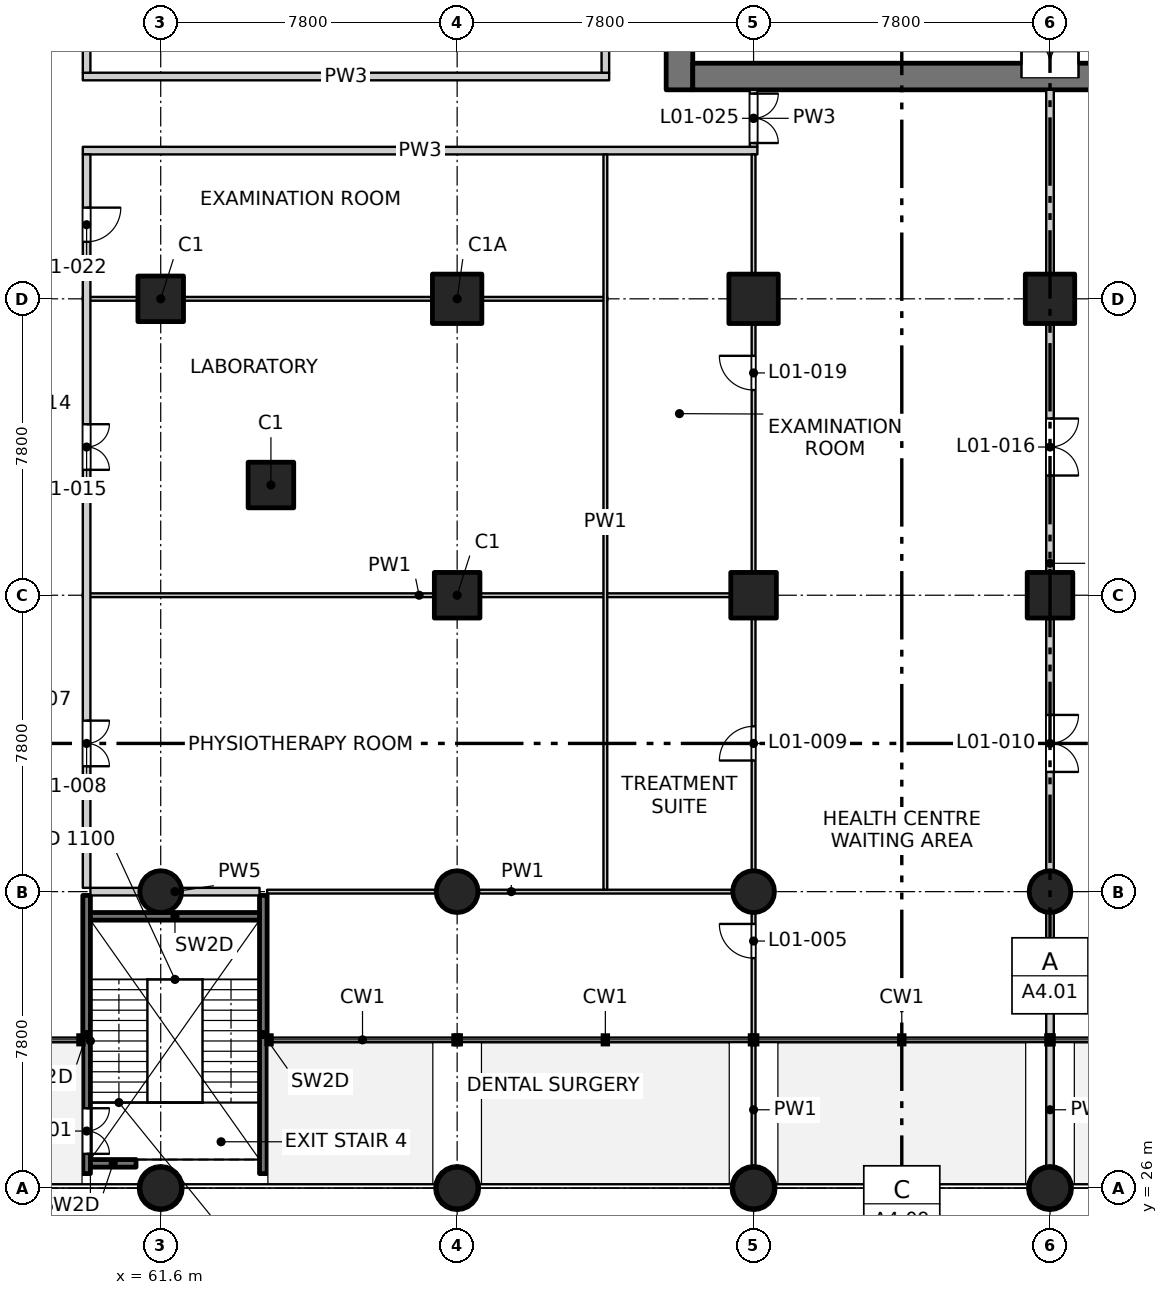
"""IFC4 building model, lengths in metres.
Left out: names, types, materials, properties, quantities, classifications, styles, units other than length and angle.
Written with IfcOpenShell. Run it as: python <this file> out.ifc"""

import sys

from ifc_helpers import new_model, si_unit, direction, frame, frame_2d, origin, origin_2d, place, context, subcontext, project, spatial, rectangle, circle, extrude, element, fill, save


model = new_model("IFC4")
c1 = context("Model", 3, precision=1e-05, world=origin(), true_north=direction((0.0, 1.0)))
c2 = subcontext(c1, "Body", "Model", "MODEL_VIEW")
j1 = project(units=[si_unit("LENGTHUNIT", "METRE"), si_unit("PLANEANGLEUNIT", "RADIAN")], contexts=[c1])
p1 = place(None, origin())
s1 = spatial("IfcSite", under=j1, at=p1, CompositionType="ELEMENT")
p2 = place(p1, origin())
s2 = spatial("IfcBuilding", under=s1, at=p2, CompositionType="ELEMENT")
p3 = place(p2, frame((0.0, 0.0, 6.0)))
s3 = spatial("IfcBuildingStorey", under=s2, at=p3, CompositionType="ELEMENT", Elevation=6.0)
for number, where, z_axis, x_axis in (
    (1, (64.5, 44.5, -0.3), (0.0, 0.0, 1.0), (1.0, 0.0, 0.0)),
    (2, (61.6, 49.4, -0.3), (0.0, 0.0, 1.0), (1.0, 0.0, 0.0)),
    (3, (69.4, 41.6, -0.3), (0.0, 0.0, 1.0), (1.0, 0.0, 0.0)),
    (4, (77.2, 41.6, -0.3), (0.0, 0.0, 1.0), (1.0, 0.0, 0.0)),
    (5, (85.0, 41.6, -0.3), (0.0, 0.0, 1.0), (1.0, 0.0, 0.0)),
):
    element("IfcColumn", number, at=place(p3, frame(where, z_axis=z_axis, x_axis=x_axis)), inside=s3, PredefinedType="COLUMN", context=c2, shape_type="SweptSolid", body=[
        extrude(rectangle(XDim=1.2, YDim=1.2, at=origin_2d()), origin(), (0.0, 0.0, 1.0), 4.5),
    ])
for number, where, z_axis, x_axis in (
    (6, (69.4, 49.4, -0.3), (0.0, 0.0, 1.0), (1.0, 0.0, 0.0)),
    (7, (77.2, 49.4, -0.3), (0.0, 0.0, 1.0), (1.0, 0.0, 0.0)),
    (8, (85.0, 49.4, -0.3), (0.0, 0.0, 1.0), (1.0, 0.0, 0.0)),
):
    element("IfcColumn", number, at=place(p3, frame(where, z_axis=z_axis, x_axis=x_axis)), inside=s3, PredefinedType="COLUMN", context=c2, shape_type="SweptSolid", body=[
        extrude(rectangle(XDim=1.3, YDim=1.3, at=origin_2d()), origin(), (0.0, 0.0, 1.0), 4.5),
    ])
for number, where, z_axis, x_axis in (
    (9, (61.6, 26.0, -0.3), (0.0, 0.0, 1.0), (1.0, 0.0, 0.0)),
    (10, (61.6, 33.8, -0.3), (0.0, 0.0, 1.0), (1.0, 0.0, 0.0)),
    (11, (69.4, 26.0, -0.3), (0.0, 0.0, 1.0), (1.0, 0.0, 0.0)),
    (12, (69.4, 33.8, -0.3), (0.0, 0.0, 1.0), (1.0, 0.0, 0.0)),
    (13, (77.2, 26.0, -0.3), (0.0, 0.0, 1.0), (1.0, 0.0, 0.0)),
    (14, (77.2, 33.8, -0.3), (0.0, 0.0, 1.0), (1.0, 0.0, 0.0)),
    (15, (85.0, 26.0, -0.3), (0.0, 0.0, 1.0), (1.0, 0.0, 0.0)),
    (16, (85.0, 33.8, -0.3), (0.0, 0.0, 1.0), (1.0, 0.0, 0.0)),
):
    element("IfcColumn", number, at=place(p3, frame(where, z_axis=z_axis, x_axis=x_axis)), inside=s3, PredefinedType="COLUMN", context=c2, shape_type="SweptSolid", body=[
        extrude(circle(Radius=0.55, at=origin_2d()), origin(), (0.0, 0.0, 1.0), 4.5),
    ])
p4 = place(p3, frame((75.25, 54.9, -0.3), z_axis=(0.0, 0.0, 1.0), x_axis=(0.0, 1.0, 0.0)))
e17 = element("IfcWall", 17, at=p4, inside=s3, PredefinedType="SOLIDWALL", context=c2, shape_type="SweptSolid", body=[
    extrude(rectangle(XDim=22.4, YDim=0.7, at=frame_2d((11.2, 0.0))), origin(), (0.0, 0.0, 1.0), 4.5),
])
p5 = place(p4, frame((7.55, 0.0, 0.3)))
e18 = element("IfcOpeningElement", 18, at=p5, cuts=e17, PredefinedType="OPENING", context=c2, shape_type="SweptSolid", body=[
    extrude(rectangle(XDim=0.9, YDim=2.1, at=frame_2d((0.45, 1.05))), frame((0.0, 0.36, 0.0), z_axis=(0.0, -1.0, 0.0), x_axis=(1.0, 0.0, 0.0)), (0.0, 0.0, 1.0), 0.72),
])
p6 = place(p4, frame((10.85, 0.0, 0.3)))
e19 = element("IfcOpeningElement", 19, at=p6, cuts=e17, PredefinedType="OPENING", context=c2, shape_type="SweptSolid", body=[
    extrude(rectangle(XDim=0.9, YDim=2.1, at=frame_2d((0.45, 1.05))), frame((0.0, 0.36, 0.0), z_axis=(0.0, -1.0, 0.0), x_axis=(1.0, 0.0, 0.0)), (0.0, 0.0, 1.0), 0.72),
])
p7 = place(p4, frame((13.85, 0.0, 0.3)))
e20 = element("IfcOpeningElement", 20, at=p7, cuts=e17, PredefinedType="OPENING", context=c2, shape_type="SweptSolid", body=[
    extrude(rectangle(XDim=0.9, YDim=2.1, at=frame_2d((0.45, 1.05))), frame((0.0, 0.36, 0.0), z_axis=(0.0, -1.0, 0.0), x_axis=(1.0, 0.0, 0.0)), (0.0, 0.0, 1.0), 0.72),
])
p8 = place(p4, frame((16.85, 0.0, 0.3)))
e21 = element("IfcOpeningElement", 21, at=p8, cuts=e17, PredefinedType="OPENING", context=c2, shape_type="SweptSolid", body=[
    extrude(rectangle(XDim=0.9, YDim=2.1, at=frame_2d((0.45, 1.05))), frame((0.0, 0.36, 0.0), z_axis=(0.0, -1.0, 0.0), x_axis=(1.0, 0.0, 0.0)), (0.0, 0.0, 1.0), 0.72),
])
p9 = place(p4, frame((20.15, 0.0, 0.3)))
e22 = element("IfcOpeningElement", 22, at=p9, cuts=e17, PredefinedType="OPENING", context=c2, shape_type="SweptSolid", body=[
    extrude(rectangle(XDim=0.9, YDim=2.1, at=frame_2d((0.45, 1.05))), frame((0.0, 0.36, 0.0), z_axis=(0.0, -1.0, 0.0), x_axis=(1.0, 0.0, 0.0)), (0.0, 0.0, 1.0), 0.72),
])
p10 = place(p3, frame((75.6, 55.25, -0.3), z_axis=(0.0, 0.0, 1.0), x_axis=(1.0, 0.0, 0.0)))
e23 = element("IfcWall", 23, at=p10, inside=s3, PredefinedType="SOLIDWALL", context=c2, shape_type="SweptSolid", body=[
    extrude(rectangle(XDim=18.8, YDim=0.7, at=frame_2d((9.4, 0.0))), origin(), (0.0, 0.0, 1.0), 4.5),
])
p11 = place(p10, frame((8.65, 0.0, 0.3)))
e24 = element("IfcOpeningElement", 24, at=p11, cuts=e23, PredefinedType="OPENING", context=c2, shape_type="SweptSolid", body=[
    extrude(rectangle(XDim=1.5, YDim=2.1, at=frame_2d((0.75, 1.05))), frame((0.0, 0.36, 0.0), z_axis=(0.0, -1.0, 0.0), x_axis=(1.0, 0.0, 0.0)), (0.0, 0.0, 1.0), 0.72),
])
p12 = place(p3, frame((59.65, 26.38, 0.0), z_axis=(0.0, 0.0, 1.0), x_axis=(0.0, 1.0, 0.0)))
e25 = element("IfcWall", 25, at=p12, inside=s3, PredefinedType="SOLIDWALL", context=c2, shape_type="SweptSolid", body=[
    extrude(rectangle(XDim=7.32, YDim=0.2, at=frame_2d((3.66, 0.0))), origin(), (0.0, 0.0, 1.0), 4.2),
])
p13 = place(p12, frame((0.52, 0.0, 0.0)))
e26 = element("IfcOpeningElement", 26, at=p13, cuts=e25, PredefinedType="OPENING", context=c2, shape_type="SweptSolid", body=[
    extrude(rectangle(XDim=1.2, YDim=2.1, at=frame_2d((0.6, 1.05))), frame((0.0, 0.11, 0.0), z_axis=(0.0, -1.0, 0.0), x_axis=(1.0, 0.0, 0.0)), (0.0, 0.0, 1.0), 0.22),
])
p14 = place(p3, frame((64.3, 26.38, 0.0), z_axis=(0.0, 0.0, 1.0), x_axis=(0.0, 1.0, 0.0)))
e27 = element("IfcWall", 27, at=p14, inside=s3, PredefinedType="SOLIDWALL", context=c2, shape_type="SweptSolid", body=[
    extrude(rectangle(XDim=7.32, YDim=0.2, at=frame_2d((3.66, 0.0))), origin(), (0.0, 0.0, 1.0), 4.2),
])
p15 = place(p3, frame((59.75, 33.15, 0.0), z_axis=(0.0, 0.0, 1.0), x_axis=(1.0, 0.0, 0.0)))
e28 = element("IfcWall", 28, at=p15, inside=s3, PredefinedType="SOLIDWALL", context=c2, shape_type="SweptSolid", body=[
    extrude(rectangle(XDim=4.45, YDim=0.2, at=frame_2d((2.225, 0.0))), origin(), (0.0, 0.0, 1.0), 4.2),
])
p16 = place(p3, frame((59.75, 26.65, 0.0), z_axis=(0.0, 0.0, 1.0), x_axis=(1.0, 0.0, 0.0)))
e29 = element("IfcWall", 29, at=p16, inside=s3, PredefinedType="SOLIDWALL", context=c2, shape_type="SweptSolid", body=[
    extrude(rectangle(XDim=1.2, YDim=0.2, at=frame_2d((0.6, 0.0))), origin(), (0.0, 0.0, 1.0), 4.2),
])
p17 = place(p3, frame((59.75, 33.8, 0.0), z_axis=(0.0, 0.0, 1.0), x_axis=(1.0, 0.0, 0.0)))
e30 = element("IfcWall", 30, at=p17, inside=s3, PredefinedType="PARTITIONING", context=c2, shape_type="SweptSolid", body=[
    extrude(rectangle(XDim=4.45, YDim=0.2, at=frame_2d((2.225, 0.0))), origin(), (0.0, 0.0, 1.0), 4.2),
])
p18 = place(p3, frame((64.4, 33.8, 0.0), z_axis=(0.0, 0.0, 1.0), x_axis=(1.0, 0.0, 0.0)))
e31 = element("IfcWall", 31, at=p18, inside=s3, PredefinedType="PARTITIONING", context=c2, shape_type="SweptSolid", body=[
    extrude(rectangle(XDim=12.85, YDim=0.1, at=frame_2d((6.425, 0.0))), origin(), (0.0, 0.0, 1.0), 4.2),
])
p19 = place(p3, frame((59.55, 41.6, 0.0), z_axis=(0.0, 0.0, 1.0), x_axis=(1.0, 0.0, 0.0)))
e32 = element("IfcWall", 32, at=p19, inside=s3, PredefinedType="PARTITIONING", context=c2, shape_type="SweptSolid", body=[
    extrude(rectangle(XDim=17.7, YDim=0.1, at=frame_2d((8.85, 0.0))), origin(), (0.0, 0.0, 1.0), 4.2),
])
p20 = place(p3, frame((59.55, 49.4, 0.0), z_axis=(0.0, 0.0, 1.0), x_axis=(1.0, 0.0, 0.0)))
e33 = element("IfcWall", 33, at=p20, inside=s3, PredefinedType="PARTITIONING", context=c2, shape_type="SweptSolid", body=[
    extrude(rectangle(XDim=13.8, YDim=0.1, at=frame_2d((6.9, 0.0))), origin(), (0.0, 0.0, 1.0), 4.2),
])
p21 = place(p3, frame((59.55, 53.3, 0.0), z_axis=(0.0, 0.0, 1.0), x_axis=(1.0, 0.0, 0.0)))
e34 = element("IfcWall", 34, at=p21, inside=s3, PredefinedType="PARTITIONING", context=c2, shape_type="SweptSolid", body=[
    extrude(rectangle(XDim=17.75, YDim=0.2, at=frame_2d((8.875, 0.0))), origin(), (0.0, 0.0, 1.0), 4.2),
])
p22 = place(p3, frame((59.55, 55.25, 0.0), z_axis=(0.0, 0.0, 1.0), x_axis=(1.0, 0.0, 0.0)))
e35 = element("IfcWall", 35, at=p22, inside=s3, PredefinedType="PARTITIONING", context=c2, shape_type="SweptSolid", body=[
    extrude(rectangle(XDim=13.85, YDim=0.2, at=frame_2d((6.925, 0.0))), origin(), (0.0, 0.0, 1.0), 4.2),
])
p23 = place(p3, frame((59.65, 33.9, 0.0), z_axis=(0.0, 0.0, 1.0), x_axis=(0.0, 1.0, 0.0)))
e36 = element("IfcWall", 36, at=p23, inside=s3, PredefinedType="PARTITIONING", context=c2, shape_type="SweptSolid", body=[
    extrude(rectangle(XDim=19.3, YDim=0.2, at=frame_2d((9.65, 0.0))), origin(), (0.0, 0.0, 1.0), 4.2),
])
p24 = place(p23, frame((3.2, 0.0, 0.0)))
e37 = element("IfcOpeningElement", 37, at=p24, cuts=e36, PredefinedType="OPENING", context=c2, shape_type="SweptSolid", body=[
    extrude(rectangle(XDim=1.2, YDim=2.1, at=frame_2d((0.6, 1.05))), frame((0.0, 0.11, 0.0), z_axis=(0.0, -1.0, 0.0), x_axis=(1.0, 0.0, 0.0)), (0.0, 0.0, 1.0), 0.22),
])
p25 = place(p23, frame((11.0, 0.0, 0.0)))
e38 = element("IfcOpeningElement", 38, at=p25, cuts=e36, PredefinedType="OPENING", context=c2, shape_type="SweptSolid", body=[
    extrude(rectangle(XDim=1.2, YDim=2.1, at=frame_2d((0.6, 1.05))), frame((0.0, 0.11, 0.0), z_axis=(0.0, -1.0, 0.0), x_axis=(1.0, 0.0, 0.0)), (0.0, 0.0, 1.0), 0.22),
])
p26 = place(p23, frame((17.0, 0.0, 0.0)))
e39 = element("IfcOpeningElement", 39, at=p26, cuts=e36, PredefinedType="OPENING", context=c2, shape_type="SweptSolid", body=[
    extrude(rectangle(XDim=0.9, YDim=2.1, at=frame_2d((0.45, 1.05))), frame((0.0, 0.11, 0.0), z_axis=(0.0, -1.0, 0.0), x_axis=(1.0, 0.0, 0.0)), (0.0, 0.0, 1.0), 0.22),
])
p27 = place(p3, frame((59.65, 55.35, 0.0), z_axis=(0.0, 0.0, 1.0), x_axis=(0.0, 1.0, 0.0)))
e40 = element("IfcWall", 40, at=p27, inside=s3, PredefinedType="PARTITIONING", context=c2, shape_type="SweptSolid", body=[
    extrude(rectangle(XDim=32.75, YDim=0.2, at=frame_2d((16.375, 0.0))), origin(), (0.0, 0.0, 1.0), 4.2),
])
p28 = place(p27, frame((5.15, 0.0, 0.0)))
e41 = element("IfcOpeningElement", 41, at=p28, cuts=e40, PredefinedType="OPENING", context=c2, shape_type="SweptSolid", body=[
    extrude(rectangle(XDim=1.2, YDim=2.1, at=frame_2d((0.6, 1.05))), frame((0.0, 0.11, 0.0), z_axis=(0.0, -1.0, 0.0), x_axis=(1.0, 0.0, 0.0)), (0.0, 0.0, 1.0), 0.22),
])
p29 = place(p27, frame((14.075, 0.0, 0.0)))
e42 = element("IfcOpeningElement", 42, at=p29, cuts=e40, PredefinedType="OPENING", context=c2, shape_type="SweptSolid", body=[
    extrude(rectangle(XDim=0.9, YDim=2.1, at=frame_2d((0.45, 1.05))), frame((0.0, 0.11, 0.0), z_axis=(0.0, -1.0, 0.0), x_axis=(1.0, 0.0, 0.0)), (0.0, 0.0, 1.0), 0.22),
])
p30 = place(p27, frame((19.925, 0.0, 0.0)))
e43 = element("IfcOpeningElement", 43, at=p30, cuts=e40, PredefinedType="OPENING", context=c2, shape_type="SweptSolid", body=[
    extrude(rectangle(XDim=0.9, YDim=2.1, at=frame_2d((0.45, 1.05))), frame((0.0, 0.11, 0.0), z_axis=(0.0, -1.0, 0.0), x_axis=(1.0, 0.0, 0.0)), (0.0, 0.0, 1.0), 0.22),
])
p31 = place(p27, frame((27.575, 0.0, 0.0)))
e44 = element("IfcOpeningElement", 44, at=p31, cuts=e40, PredefinedType="OPENING", context=c2, shape_type="SweptSolid", body=[
    extrude(rectangle(XDim=1.2, YDim=2.1, at=frame_2d((0.6, 1.05))), frame((0.0, 0.11, 0.0), z_axis=(0.0, -1.0, 0.0), x_axis=(1.0, 0.0, 0.0)), (0.0, 0.0, 1.0), 0.22),
])
p32 = place(p3, frame((73.3, 33.85, 0.0), z_axis=(0.0, 0.0, 1.0), x_axis=(0.0, 1.0, 0.0)))
e45 = element("IfcWall", 45, at=p32, inside=s3, PredefinedType="PARTITIONING", context=c2, shape_type="SweptSolid", body=[
    extrude(rectangle(XDim=19.35, YDim=0.1, at=frame_2d((9.675, 0.0))), origin(), (0.0, 0.0, 1.0), 4.2),
])
p33 = place(p3, frame((73.3, 55.35, 0.0), z_axis=(0.0, 0.0, 1.0), x_axis=(0.0, 1.0, 0.0)))
e46 = element("IfcWall", 46, at=p33, inside=s3, PredefinedType="PARTITIONING", context=c2, shape_type="SweptSolid", body=[
    extrude(rectangle(XDim=32.75, YDim=0.2, at=frame_2d((16.375, 0.0))), origin(), (0.0, 0.0, 1.0), 4.2),
])
p34 = place(p3, frame((77.2, 26.3, 0.0), z_axis=(0.0, 0.0, 1.0), x_axis=(0.0, 1.0, 0.0)))
e47 = element("IfcWall", 47, at=p34, inside=s3, PredefinedType="PARTITIONING", context=c2, shape_type="SweptSolid", body=[
    extrude(rectangle(XDim=3.52, YDim=0.1, at=frame_2d((1.76, 0.0))), origin(), (0.0, 0.0, 1.0), 4.2),
])
p35 = place(p3, frame((77.2, 29.98, 0.0), z_axis=(0.0, 0.0, 1.0), x_axis=(0.0, 1.0, 0.0)))
e48 = element("IfcWall", 48, at=p35, inside=s3, PredefinedType="PARTITIONING", context=c2, shape_type="SweptSolid", body=[
    extrude(rectangle(XDim=23.22, YDim=0.1, at=frame_2d((11.61, 0.0))), origin(), (0.0, 0.0, 1.0), 4.2),
])
p36 = place(p35, frame((2.07, 0.0, 0.0)))
e49 = element("IfcOpeningElement", 49, at=p36, cuts=e48, PredefinedType="OPENING", context=c2, shape_type="SweptSolid", body=[
    extrude(rectangle(XDim=0.9, YDim=2.1, at=frame_2d((0.45, 1.05))), frame((0.0, 0.06, 0.0), z_axis=(0.0, -1.0, 0.0), x_axis=(1.0, 0.0, 0.0)), (0.0, 0.0, 1.0), 0.12),
])
p37 = place(p35, frame((7.27, 0.0, 0.0)))
e50 = element("IfcOpeningElement", 50, at=p37, cuts=e48, PredefinedType="OPENING", context=c2, shape_type="SweptSolid", body=[
    extrude(rectangle(XDim=0.9, YDim=2.1, at=frame_2d((0.45, 1.05))), frame((0.0, 0.06, 0.0), z_axis=(0.0, -1.0, 0.0), x_axis=(1.0, 0.0, 0.0)), (0.0, 0.0, 1.0), 0.12),
])
p38 = place(p35, frame((17.02, 0.0, 0.0)))
e51 = element("IfcOpeningElement", 51, at=p38, cuts=e48, PredefinedType="OPENING", context=c2, shape_type="SweptSolid", body=[
    extrude(rectangle(XDim=0.9, YDim=2.1, at=frame_2d((0.45, 1.05))), frame((0.0, 0.06, 0.0), z_axis=(0.0, -1.0, 0.0), x_axis=(1.0, 0.0, 0.0)), (0.0, 0.0, 1.0), 0.12),
])
p39 = place(p3, frame((77.2, 53.4, 0.0), z_axis=(0.0, 0.0, 1.0), x_axis=(0.0, 1.0, 0.0)))
e52 = element("IfcWall", 52, at=p39, inside=s3, PredefinedType="PARTITIONING", context=c2, shape_type="SweptSolid", body=[
    extrude(rectangle(XDim=1.5, YDim=0.2, at=frame_2d((0.75, 0.0))), origin(), (0.0, 0.0, 1.0), 4.2),
])
p40 = place(p39, frame((0.1, 0.0, 0.0)))
e53 = element("IfcOpeningElement", 53, at=p40, cuts=e52, PredefinedType="OPENING", context=c2, shape_type="SweptSolid", body=[
    extrude(rectangle(XDim=1.3, YDim=2.1, at=frame_2d((0.65, 1.05))), frame((0.0, 0.11, 0.0), z_axis=(0.0, -1.0, 0.0), x_axis=(1.0, 0.0, 0.0)), (0.0, 0.0, 1.0), 0.22),
])
p41 = place(p3, frame((85.0, 26.3, 0.0), z_axis=(0.0, 0.0, 1.0), x_axis=(0.0, 1.0, 0.0)))
e54 = element("IfcWall", 54, at=p41, inside=s3, PredefinedType="PARTITIONING", context=c2, shape_type="SweptSolid", body=[
    extrude(rectangle(XDim=3.52, YDim=0.2, at=frame_2d((1.76, 0.0))), origin(), (0.0, 0.0, 1.0), 4.2),
])
p42 = place(p3, frame((85.0, 29.98, 0.0), z_axis=(0.0, 0.0, 1.0), x_axis=(0.0, 1.0, 0.0)))
e55 = element("IfcWall", 55, at=p42, inside=s3, PredefinedType="PARTITIONING", context=c2, shape_type="SweptSolid", body=[
    extrude(rectangle(XDim=24.92, YDim=0.2, at=frame_2d((12.46, 0.0))), origin(), (0.0, 0.0, 1.0), 4.2),
])
p43 = place(p42, frame((6.97, 0.0, 0.0)))
e56 = element("IfcOpeningElement", 56, at=p43, cuts=e55, PredefinedType="OPENING", context=c2, shape_type="SweptSolid", body=[
    extrude(rectangle(XDim=1.5, YDim=2.1, at=frame_2d((0.75, 1.05))), frame((0.0, 0.11, 0.0), z_axis=(0.0, -1.0, 0.0), x_axis=(1.0, 0.0, 0.0)), (0.0, 0.0, 1.0), 0.22),
])
p44 = place(p42, frame((14.77, 0.0, 0.0)))
e57 = element("IfcOpeningElement", 57, at=p44, cuts=e55, PredefinedType="OPENING", context=c2, shape_type="SweptSolid", body=[
    extrude(rectangle(XDim=1.5, YDim=2.1, at=frame_2d((0.75, 1.05))), frame((0.0, 0.11, 0.0), z_axis=(0.0, -1.0, 0.0), x_axis=(1.0, 0.0, 0.0)), (0.0, 0.0, 1.0), 0.22),
])
p45 = place(p13, origin())
e58 = element("IfcDoor", 58, at=p45, inside=s3, OperationType="DOUBLE_DOOR_SINGLE_SWING", PredefinedType="DOOR", context=c2, shape_type="SweptSolid", body=[
    extrude(rectangle(XDim=1.2, YDim=2.1, at=frame_2d((0.6, 1.05))), frame((0.0, 0.025, 0.0), z_axis=(0.0, -1.0, 0.0), x_axis=(1.0, 0.0, 0.0)), (0.0, 0.0, 1.0), 0.05),
])
fill(e26, e58)
p46 = place(p36, origin())
e59 = element("IfcDoor", 59, at=p46, inside=s3, OperationType="SINGLE_SWING_RIGHT", PredefinedType="DOOR", context=c2, shape_type="SweptSolid", body=[
    extrude(rectangle(XDim=0.9, YDim=2.1, at=frame_2d((0.45, 1.05))), frame((0.0, 0.025, 0.0), z_axis=(0.0, -1.0, 0.0), x_axis=(1.0, 0.0, 0.0)), (0.0, 0.0, 1.0), 0.05),
])
fill(e49, e59)
p47 = place(p24, origin())
e60 = element("IfcDoor", 60, at=p47, inside=s3, OperationType="DOUBLE_DOOR_SINGLE_SWING", PredefinedType="DOOR", context=c2, shape_type="SweptSolid", body=[
    extrude(rectangle(XDim=1.2, YDim=2.1, at=frame_2d((0.6, 1.05))), frame((0.0, 0.025, 0.0), z_axis=(0.0, -1.0, 0.0), x_axis=(1.0, 0.0, 0.0)), (0.0, 0.0, 1.0), 0.05),
])
fill(e37, e60)
p48 = place(p37, origin())
e61 = element("IfcDoor", 61, at=p48, inside=s3, OperationType="SINGLE_SWING_LEFT", PredefinedType="DOOR", context=c2, shape_type="SweptSolid", body=[
    extrude(rectangle(XDim=0.9, YDim=2.1, at=frame_2d((0.45, 1.05))), frame((0.0, 0.025, 0.0), z_axis=(0.0, -1.0, 0.0), x_axis=(1.0, 0.0, 0.0)), (0.0, 0.0, 1.0), 0.05),
])
fill(e50, e61)
p49 = place(p43, origin())
e62 = element("IfcDoor", 62, at=p49, inside=s3, OperationType="DOUBLE_DOOR_SINGLE_SWING", PredefinedType="DOOR", context=c2, shape_type="SweptSolid", body=[
    extrude(rectangle(XDim=1.5, YDim=2.1, at=frame_2d((0.75, 1.05))), frame((0.0, 0.025, 0.0), z_axis=(0.0, -1.0, 0.0), x_axis=(1.0, 0.0, 0.0)), (0.0, 0.0, 1.0), 0.05),
])
fill(e56, e62)
p50 = place(p25, origin())
e63 = element("IfcDoor", 63, at=p50, inside=s3, OperationType="DOUBLE_DOOR_SINGLE_SWING", PredefinedType="DOOR", context=c2, shape_type="SweptSolid", body=[
    extrude(rectangle(XDim=1.2, YDim=2.1, at=frame_2d((0.6, 1.05))), frame((0.0, 0.025, 0.0), z_axis=(0.0, -1.0, 0.0), x_axis=(1.0, 0.0, 0.0)), (0.0, 0.0, 1.0), 0.05),
])
fill(e38, e63)
p51 = place(p44, origin())
e64 = element("IfcDoor", 64, at=p51, inside=s3, OperationType="DOUBLE_DOOR_SINGLE_SWING", PredefinedType="DOOR", context=c2, shape_type="SweptSolid", body=[
    extrude(rectangle(XDim=1.5, YDim=2.1, at=frame_2d((0.75, 1.05))), frame((0.0, 0.025, 0.0), z_axis=(0.0, -1.0, 0.0), x_axis=(1.0, 0.0, 0.0)), (0.0, 0.0, 1.0), 0.05),
])
fill(e57, e64)
p52 = place(p38, origin())
e65 = element("IfcDoor", 65, at=p52, inside=s3, OperationType="SINGLE_SWING_RIGHT", PredefinedType="DOOR", context=c2, shape_type="SweptSolid", body=[
    extrude(rectangle(XDim=0.9, YDim=2.1, at=frame_2d((0.45, 1.05))), frame((0.0, 0.025, 0.0), z_axis=(0.0, -1.0, 0.0), x_axis=(1.0, 0.0, 0.0)), (0.0, 0.0, 1.0), 0.05),
])
fill(e51, e65)
p53 = place(p26, origin())
e66 = element("IfcDoor", 66, at=p53, inside=s3, OperationType="SINGLE_SWING_LEFT", PredefinedType="DOOR", context=c2, shape_type="SweptSolid", body=[
    extrude(rectangle(XDim=0.9, YDim=2.1, at=frame_2d((0.45, 1.05))), frame((0.0, 0.025, 0.0), z_axis=(0.0, -1.0, 0.0), x_axis=(1.0, 0.0, 0.0)), (0.0, 0.0, 1.0), 0.05),
])
fill(e39, e66)
p54 = place(p40, origin())
e67 = element("IfcDoor", 67, at=p54, inside=s3, OperationType="DOUBLE_DOOR_SINGLE_SWING", PredefinedType="DOOR", context=c2, shape_type="SweptSolid", body=[
    extrude(rectangle(XDim=1.3, YDim=2.1, at=frame_2d((0.65, 1.05))), frame((0.0, 0.025, 0.0), z_axis=(0.0, -1.0, 0.0), x_axis=(1.0, 0.0, 0.0)), (0.0, 0.0, 1.0), 0.05),
])
fill(e53, e67)
p55 = place(p11, origin())
e68 = element("IfcDoor", 68, at=p55, inside=s3, OperationType="DOUBLE_DOOR_SINGLE_SWING", PredefinedType="DOOR", context=c2, shape_type="SweptSolid", body=[
    extrude(rectangle(XDim=1.5, YDim=2.1, at=frame_2d((0.75, 1.05))), frame((0.0, 0.335, 0.0), z_axis=(0.0, -1.0, 0.0), x_axis=(1.0, 0.0, 0.0)), (0.0, 0.0, 1.0), 0.05),
])
fill(e24, e68)
save(model, sys.argv[1])
